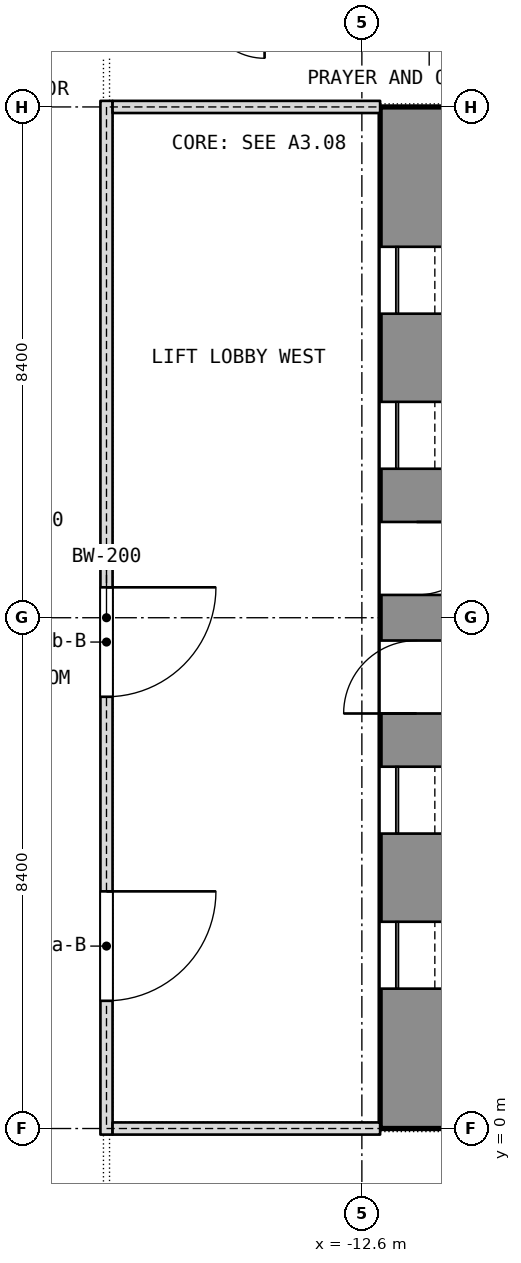
"""IFC4 building model, lengths in metres.
Left out: names, types, materials, properties, quantities, classifications, styles, units other than length and angle.
Written with IfcOpenShell. Run it as: python <this file> out.ifc"""

import sys

from ifc_helpers import new_model, si_unit, direction, frame, frame_2d, origin, place, context, subcontext, project, spatial, rectangle, extrude, element, fill, save


model = new_model("IFC4")
c1 = context("Model", 3, precision=1e-05, world=origin(), true_north=direction((0.0, 1.0)))
c2 = subcontext(c1, "Body", "Model", "MODEL_VIEW")
j1 = project(units=[si_unit("LENGTHUNIT", "METRE"), si_unit("PLANEANGLEUNIT", "RADIAN")], contexts=[c1])
p1 = place(None, origin())
s1 = spatial("IfcSite", under=j1, at=p1, CompositionType="ELEMENT")
p2 = place(p1, origin())
s2 = spatial("IfcBuilding", under=s1, at=p2, CompositionType="ELEMENT")
p3 = place(p2, frame((0.0, 0.0, 50.9)))
s3 = spatial("IfcBuildingStorey", under=s2, at=p3, CompositionType="ELEMENT", Elevation=50.9)
p4 = place(p3, frame((-11.7, 0.0, 0.0), z_axis=(0.0, 0.0, 1.0), x_axis=(0.0, 1.0, 0.0)))
e1 = element("IfcWall", 1, at=p4, inside=s3, PredefinedType="SHEAR", context=c2, shape_type="SweptSolid", body=[
    extrude(rectangle(XDim=16.8, YDim=1.2, at=frame_2d((8.4, 0.0))), origin(), (0.0, 0.0, 1.0), 3.6),
])
p5 = place(p4, frame((2.3, 0.0, 0.0)))
e2 = element("IfcOpeningElement", 2, at=p5, cuts=e1, PredefinedType="OPENING", context=c2, shape_type="SweptSolid", body=[
    extrude(rectangle(XDim=1.1, YDim=2.1, at=frame_2d((0.55, 1.05))), frame((0.0, 0.6, 0.0), z_axis=(0.0, -1.0, 0.0), x_axis=(1.0, 0.0, 0.0)), (0.0, 0.0, 1.0), 1.2),
])
p6 = place(p4, frame((4.85, 0.0, 0.0)))
e3 = element("IfcOpeningElement", 3, at=p6, cuts=e1, PredefinedType="OPENING", context=c2, shape_type="SweptSolid", body=[
    extrude(rectangle(XDim=1.1, YDim=2.1, at=frame_2d((0.55, 1.05))), frame((0.0, 0.6, 0.0), z_axis=(0.0, -1.0, 0.0), x_axis=(1.0, 0.0, 0.0)), (0.0, 0.0, 1.0), 1.2),
])
p7 = place(p4, frame((6.825, 0.0, 0.0)))
e4 = element("IfcOpeningElement", 4, at=p7, cuts=e1, PredefinedType="OPENING", context=c2, shape_type="SweptSolid", body=[
    extrude(rectangle(XDim=1.2, YDim=2.1, at=frame_2d((0.6, 1.05))), frame((0.0, 0.6, 0.0), z_axis=(0.0, -1.0, 0.0), x_axis=(1.0, 0.0, 0.0)), (0.0, 0.0, 1.0), 1.2),
])
p8 = place(p4, frame((13.4, 0.0, 0.0)))
e5 = element("IfcOpeningElement", 5, at=p8, cuts=e1, PredefinedType="OPENING", context=c2, shape_type="SweptSolid", body=[
    extrude(rectangle(XDim=1.1, YDim=2.1, at=frame_2d((0.55, 1.05))), frame((0.0, 0.6, 0.0), z_axis=(0.0, -1.0, 0.0), x_axis=(1.0, 0.0, 0.0)), (0.0, 0.0, 1.0), 1.2),
])
p9 = place(p4, frame((10.85, 0.0, 0.0)))
e6 = element("IfcOpeningElement", 6, at=p9, cuts=e1, PredefinedType="OPENING", context=c2, shape_type="SweptSolid", body=[
    extrude(rectangle(XDim=1.1, YDim=2.1, at=frame_2d((0.55, 1.05))), frame((0.0, 0.6, 0.0), z_axis=(0.0, -1.0, 0.0), x_axis=(1.0, 0.0, 0.0)), (0.0, 0.0, 1.0), 1.2),
])
p10 = place(p4, frame((8.775, 0.0, 0.0)))
e7 = element("IfcOpeningElement", 7, at=p10, cuts=e1, PredefinedType="OPENING", context=c2, shape_type="SweptSolid", body=[
    extrude(rectangle(XDim=1.2, YDim=2.1, at=frame_2d((0.6, 1.05))), frame((0.0, 0.6, 0.0), z_axis=(0.0, -1.0, 0.0), x_axis=(1.0, 0.0, 0.0)), (0.0, 0.0, 1.0), 1.2),
])
p11 = place(p3, frame((-16.8, -0.1, 0.0), z_axis=(0.0, 0.0, 1.0), x_axis=(0.0, 1.0, 0.0)))
e8 = element("IfcWall", 8, at=p11, inside=s3, PredefinedType="PARTITIONING", context=c2, shape_type="SweptSolid", body=[
    extrude(rectangle(XDim=17.0, YDim=0.2, at=frame_2d((8.5, 0.0))), origin(), (0.0, 0.0, 1.0), 3.34),
])
p12 = place(p11, frame((2.2, 0.0, 0.0)))
e9 = element("IfcOpeningElement", 9, at=p12, cuts=e8, PredefinedType="OPENING", context=c2, shape_type="SweptSolid", body=[
    extrude(rectangle(XDim=1.8, YDim=2.1, at=frame_2d((0.9, 1.05))), frame((0.0, 0.1, 0.0), z_axis=(0.0, -1.0, 0.0), x_axis=(1.0, 0.0, 0.0)), (0.0, 0.0, 1.0), 0.2),
])
p13 = place(p11, frame((7.2, 0.0, 0.0)))
e10 = element("IfcOpeningElement", 10, at=p13, cuts=e8, PredefinedType="OPENING", context=c2, shape_type="SweptSolid", body=[
    extrude(rectangle(XDim=1.8, YDim=2.1, at=frame_2d((0.9, 1.05))), frame((0.0, 0.1, 0.0), z_axis=(0.0, -1.0, 0.0), x_axis=(1.0, 0.0, 0.0)), (0.0, 0.0, 1.0), 0.2),
])
for number, where, z_axis, x_axis in (
    (11, (-16.7, 0.0, 0.0), (0.0, 0.0, 1.0), (1.0, 0.0, 0.0)),
    (12, (-16.7, 16.8, 0.0), (0.0, 0.0, 1.0), (1.0, 0.0, 0.0)),
):
    element("IfcWall", number, at=place(p3, frame(where, z_axis=z_axis, x_axis=x_axis)), inside=s3, PredefinedType="PARTITIONING", context=c2, shape_type="SweptSolid", body=[
        extrude(rectangle(XDim=4.4, YDim=0.2, at=frame_2d((2.2, 0.0))), origin(), (0.0, 0.0, 1.0), 2.84),
    ])
p14 = place(p5, origin())
e13 = element("IfcDoor", 13, at=p14, inside=s3, OperationType="SLIDING_TO_LEFT", PredefinedType="DOOR", context=c2, shape_type="SweptSolid", body=[
    extrude(rectangle(XDim=1.1, YDim=2.1, at=frame_2d((0.55, 1.05))), frame((0.0, 0.025, 0.0), z_axis=(0.0, -1.0, 0.0), x_axis=(1.0, 0.0, 0.0)), (0.0, 0.0, 1.0), 0.05),
])
fill(e2, e13)
p15 = place(p6, origin())
e14 = element("IfcDoor", 14, at=p15, inside=s3, OperationType="SLIDING_TO_LEFT", PredefinedType="DOOR", context=c2, shape_type="SweptSolid", body=[
    extrude(rectangle(XDim=1.1, YDim=2.1, at=frame_2d((0.55, 1.05))), frame((0.0, 0.025, 0.0), z_axis=(0.0, -1.0, 0.0), x_axis=(1.0, 0.0, 0.0)), (0.0, 0.0, 1.0), 0.05),
])
fill(e3, e14)
p16 = place(p7, origin())
e15 = element("IfcDoor", 15, at=p16, inside=s3, OperationType="SINGLE_SWING_LEFT", PredefinedType="DOOR", context=c2, shape_type="SweptSolid", body=[
    extrude(rectangle(XDim=1.2, YDim=2.1, at=frame_2d((0.6, 1.05))), frame((0.0, 0.025, 0.0), z_axis=(0.0, -1.0, 0.0), x_axis=(1.0, 0.0, 0.0)), (0.0, 0.0, 1.0), 0.05),
])
fill(e4, e15)
p17 = place(p8, origin())
e16 = element("IfcDoor", 16, at=p17, inside=s3, OperationType="SLIDING_TO_LEFT", PredefinedType="DOOR", context=c2, shape_type="SweptSolid", body=[
    extrude(rectangle(XDim=1.1, YDim=2.1, at=frame_2d((0.55, 1.05))), frame((0.0, 0.025, 0.0), z_axis=(0.0, -1.0, 0.0), x_axis=(1.0, 0.0, 0.0)), (0.0, 0.0, 1.0), 0.05),
])
fill(e5, e16)
p18 = place(p9, origin())
e17 = element("IfcDoor", 17, at=p18, inside=s3, OperationType="SLIDING_TO_LEFT", PredefinedType="DOOR", context=c2, shape_type="SweptSolid", body=[
    extrude(rectangle(XDim=1.1, YDim=2.1, at=frame_2d((0.55, 1.05))), frame((0.0, 0.025, 0.0), z_axis=(0.0, -1.0, 0.0), x_axis=(1.0, 0.0, 0.0)), (0.0, 0.0, 1.0), 0.05),
])
fill(e6, e17)
p19 = place(p10, origin())
e18 = element("IfcDoor", 18, at=p19, inside=s3, OperationType="SINGLE_SWING_LEFT", PredefinedType="DOOR", context=c2, shape_type="SweptSolid", body=[
    extrude(rectangle(XDim=1.2, YDim=2.1, at=frame_2d((0.6, 1.05))), frame((0.0, 0.025, 0.0), z_axis=(0.0, -1.0, 0.0), x_axis=(1.0, 0.0, 0.0)), (0.0, 0.0, 1.0), 0.05),
])
fill(e7, e18)
p20 = place(p12, origin())
e19 = element("IfcDoor", 19, at=p20, inside=s3, OperationType="DOUBLE_DOOR_SINGLE_SWING", PredefinedType="DOOR", context=c2, shape_type="SweptSolid", body=[
    extrude(rectangle(XDim=1.8, YDim=2.1, at=frame_2d((0.9, 1.05))), frame((0.0, 0.025, 0.0), z_axis=(0.0, -1.0, 0.0), x_axis=(1.0, 0.0, 0.0)), (0.0, 0.0, 1.0), 0.05),
])
fill(e9, e19)
p21 = place(p13, origin())
e20 = element("IfcDoor", 20, at=p21, inside=s3, OperationType="DOUBLE_DOOR_SINGLE_SWING", PredefinedType="DOOR", context=c2, shape_type="SweptSolid", body=[
    extrude(rectangle(XDim=1.8, YDim=2.1, at=frame_2d((0.9, 1.05))), frame((0.0, 0.025, 0.0), z_axis=(0.0, -1.0, 0.0), x_axis=(1.0, 0.0, 0.0)), (0.0, 0.0, 1.0), 0.05),
])
fill(e10, e20)
save(model, sys.argv[1])
